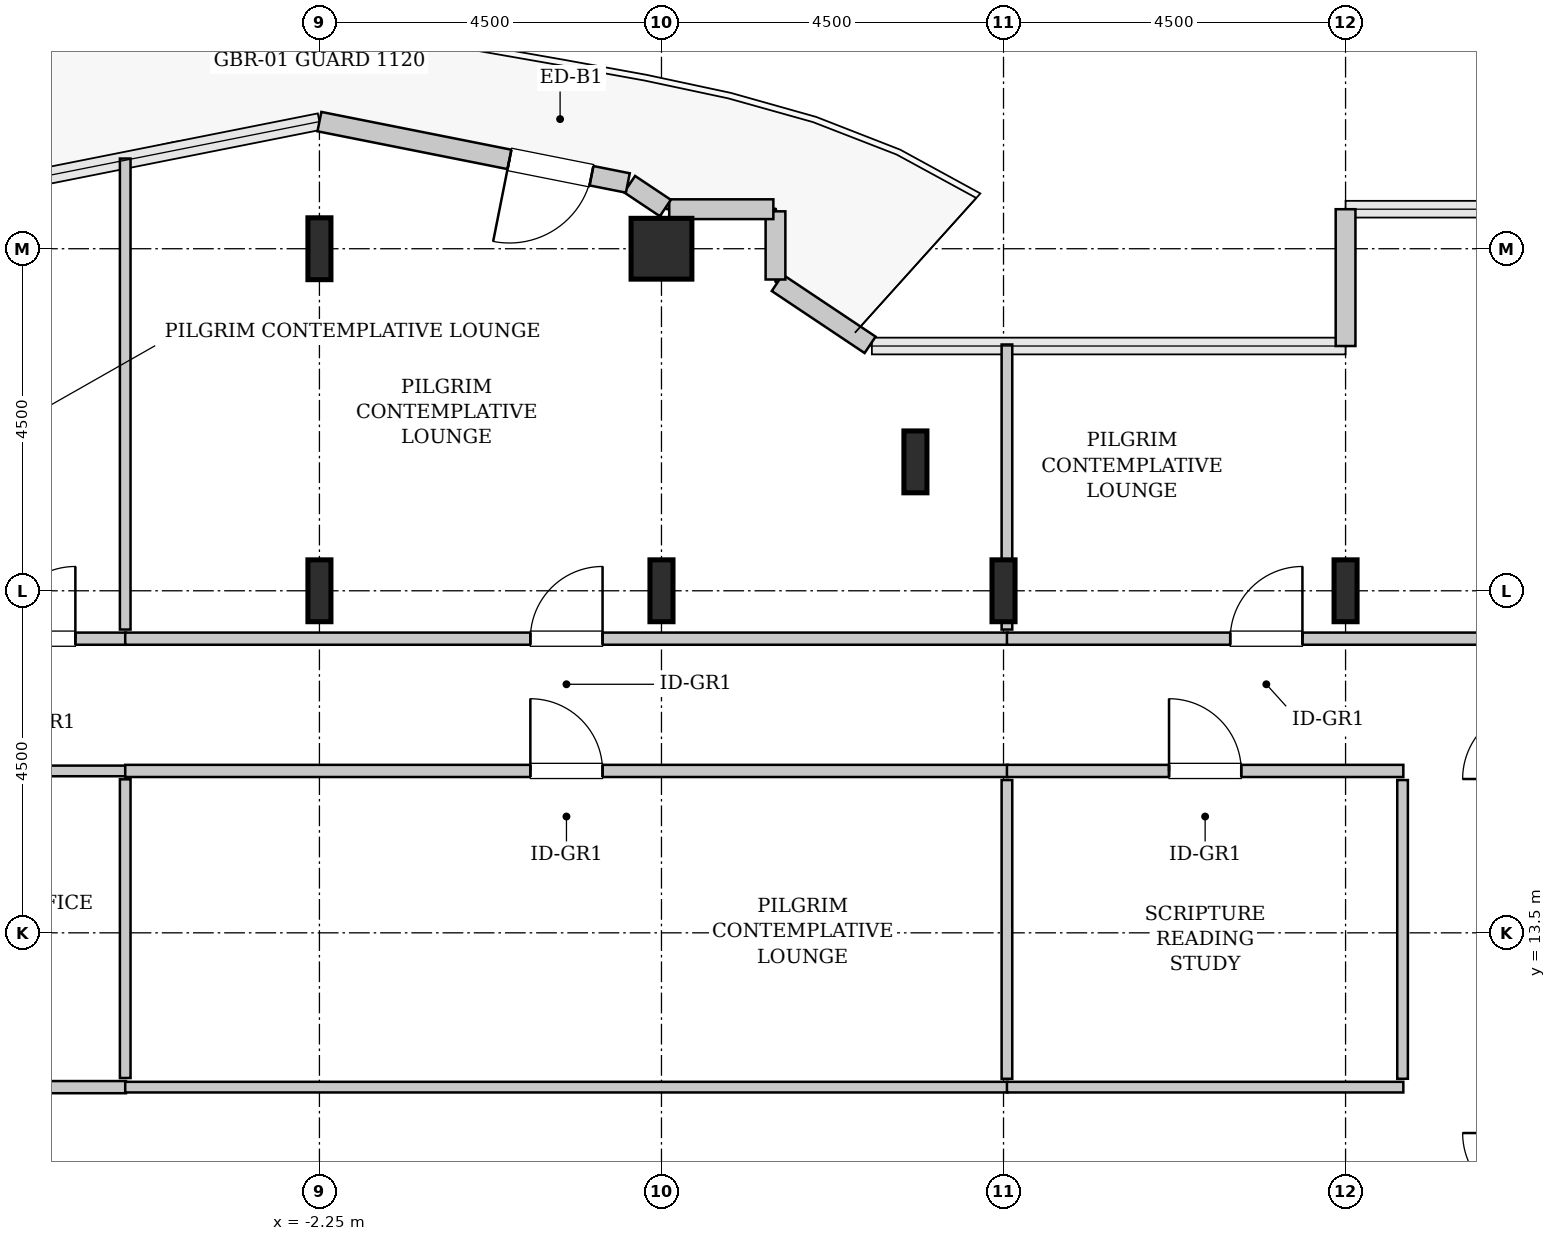
"""IFC4 building model, lengths in metres.
Left out: names, types, materials, properties, quantities, classifications, styles, units other than length and angle.
Written with IfcOpenShell. Run it as: python <this file> out.ifc"""

import sys

from ifc_helpers import new_model, si_unit, direction, frame, frame_2d, origin, origin_2d, place, context, subcontext, project, spatial, rectangle, hollow_rectangle, i_section, extrude, source, transform, mapped, element, fill, save


model = new_model("IFC4")
c1 = context("Model", 3, precision=1e-05, world=origin(), true_north=direction((0.0, 1.0)))
c2 = subcontext(c1, "Body", "Model", "MODEL_VIEW")
j1 = project(units=[si_unit("LENGTHUNIT", "METRE"), si_unit("PLANEANGLEUNIT", "RADIAN")], contexts=[c1])
p1 = place(None, origin())
s1 = spatial("IfcSite", under=j1, at=p1, CompositionType="ELEMENT")
p2 = place(p1, origin())
s2 = spatial("IfcBuilding", under=s1, at=p2, CompositionType="ELEMENT")
p3 = place(p2, frame((0.0, 0.0, 164.0)))
s3 = spatial("IfcBuildingStorey", under=s2, at=p3, CompositionType="ELEMENT", Elevation=164.0)
m1 = source(origin(), c2, "Body", "SweptSolid", [
    extrude(i_section(OverallWidth=0.303, OverallDepth=0.814, WebThickness=0.021, FlangeThickness=0.04, FilletRadius=0.03, at=origin_2d()), origin(), (0.0, 0.0, 1.0), 3.8),
])
for number, where, z_axis, x_axis in (
    (1, (-2.25, 18.0, 0.0), (0.0, 0.0, 1.0), (1.0, 0.0, 0.0)),
    (2, (-2.25, 22.5, 0.0), (0.0, 0.0, 1.0), (1.0, 0.0, 0.0)),
    (3, (2.25, 18.0, 0.0), (0.0, 0.0, 1.0), (1.0, 0.0, 0.0)),
):
    element("IfcColumn", number, at=place(p3, frame(where, z_axis=z_axis, x_axis=x_axis)), inside=s3, PredefinedType="COLUMN", context=c2, shape_type="MappedRepresentation", body=[
        mapped(m1, transform((0.0, 0.0, 0.0), x_axis=(1.0, 0.0, 0.0), y_axis=(0.0, 1.0, 0.0), z_axis=(0.0, 0.0, 1.0), scale=1.0)),
    ])
m2 = source(origin(), c2, "Body", "SweptSolid", [
    extrude(hollow_rectangle(XDim=0.8, YDim=0.8, WallThickness=0.04, InnerFilletRadius=0.04, OuterFilletRadius=0.08, at=origin_2d()), origin(), (0.0, 0.0, 1.0), 3.8),
])
p4 = place(p3, frame((2.25, 22.5, 0.0), z_axis=(0.0, 0.0, 1.0), x_axis=(1.0, 0.0, 0.0)))
e4 = element("IfcColumn", 4, at=p4, inside=s3, PredefinedType="COLUMN", context=c2, shape_type="MappedRepresentation", body=[
    mapped(m2, transform((0.0, 0.0, 0.0), x_axis=(1.0, 0.0, 0.0), y_axis=(0.0, 1.0, 0.0), z_axis=(0.0, 0.0, 1.0), scale=1.0)),
])
for number, where, z_axis, x_axis in (
    (5, (5.591, 19.696, 0.0), (0.0, 0.0, 1.0), (1.0, 0.0, 0.0)),
    (6, (6.75, 18.0, 0.0), (0.0, 0.0, 1.0), (1.0, 0.0, 0.0)),
    (7, (11.25, 18.0, 0.0), (0.0, 0.0, 1.0), (1.0, 0.0, 0.0)),
):
    element("IfcColumn", number, at=place(p3, frame(where, z_axis=z_axis, x_axis=x_axis)), inside=s3, PredefinedType="COLUMN", context=c2, shape_type="MappedRepresentation", body=[
        mapped(m1, transform((0.0, 0.0, 0.0), x_axis=(1.0, 0.0, 0.0), y_axis=(0.0, 1.0, 0.0), z_axis=(0.0, 0.0, 1.0), scale=1.0)),
    ])
m3 = source(origin(), c2, "Body", "SweptSolid", [
    extrude(rectangle(XDim=1.8, YDim=0.26, at=frame_2d((0.9, 0.0))), origin(), (0.0, 0.0, 1.0), 3.55),
])
p5 = place(p3, frame((11.25, 23.02, 0.0), z_axis=(0.0, 0.0, 1.0), x_axis=(0.0, -1.0, 0.0)))
e8 = element("IfcWall", 8, at=p5, inside=s3, PredefinedType="SOLIDWALL", context=c2, shape_type="MappedRepresentation", body=[
    mapped(m3, transform((0.0, 0.0, 0.0), x_axis=(1.0, 0.0, 0.0), y_axis=(0.0, 1.0, 0.0), z_axis=(0.0, 0.0, 1.0), scale=1.0)),
])
m4 = source(origin(), c2, "Body", "SweptSolid", [
    extrude(rectangle(XDim=1.469, YDim=0.26, at=frame_2d((0.734, 0.0))), origin(), (0.0, 0.0, 1.0), 3.55),
])
p6 = place(p3, frame((4.995, 21.236, 0.0), z_axis=(0.0, 0.0, 1.0), x_axis=(-0.831461760506, 0.555581983884, 0.0)))
e9 = element("IfcWall", 9, at=p6, inside=s3, PredefinedType="SOLIDWALL", context=c2, shape_type="MappedRepresentation", body=[
    mapped(m4, transform((0.0, 0.0, 0.0), x_axis=(1.0, 0.0, 0.0), y_axis=(0.0, 1.0, 0.0), z_axis=(0.0, 0.0, 1.0), scale=1.0)),
])
m5 = source(origin(), c2, "Body", "SweptSolid", [
    extrude(rectangle(XDim=0.897, YDim=0.26, at=frame_2d((0.448, 0.0))), origin(), (0.0, 0.0, 1.0), 3.55),
])
p7 = place(p3, frame((3.75, 22.095, 0.0), z_axis=(0.0, 0.0, 1.0), x_axis=(0.0, 1.0, 0.0)))
e10 = element("IfcWall", 10, at=p7, inside=s3, PredefinedType="SOLIDWALL", context=c2, shape_type="MappedRepresentation", body=[
    mapped(m5, transform((0.0, 0.0, 0.0), x_axis=(1.0, 0.0, 0.0), y_axis=(0.0, 1.0, 0.0), z_axis=(0.0, 0.0, 1.0), scale=1.0)),
])
m6 = source(origin(), c2, "Body", "SweptSolid", [
    extrude(rectangle(XDim=1.37, YDim=0.26, at=frame_2d((0.685, 0.0))), origin(), (0.0, 0.0, 1.0), 3.55),
])
p8 = place(p3, frame((3.722, 23.02, 0.0), z_axis=(0.0, 0.0, 1.0), x_axis=(-1.0, 0.0, 0.0)))
e11 = element("IfcWall", 11, at=p8, inside=s3, PredefinedType="SOLIDWALL", context=c2, shape_type="MappedRepresentation", body=[
    mapped(m6, transform((0.0, 0.0, 0.0), x_axis=(1.0, 0.0, 0.0), y_axis=(0.0, 1.0, 0.0), z_axis=(0.0, 0.0, 1.0), scale=1.0)),
])
m7 = source(origin(), c2, "Body", "SweptSolid", [
    extrude(rectangle(XDim=0.565, YDim=0.26, at=frame_2d((0.283, 0.0))), origin(), (0.0, 0.0, 1.0), 3.55),
])
p9 = place(p3, frame((2.301, 23.036, 0.0), z_axis=(0.0, 0.0, 1.0), x_axis=(-0.831651492666, 0.555297933317, 0.0)))
e12 = element("IfcWall", 12, at=p9, inside=s3, PredefinedType="SOLIDWALL", context=c2, shape_type="MappedRepresentation", body=[
    mapped(m7, transform((0.0, 0.0, 0.0), x_axis=(1.0, 0.0, 0.0), y_axis=(0.0, 1.0, 0.0), z_axis=(0.0, 0.0, 1.0), scale=1.0)),
])
m8 = source(origin(), c2, "Body", "SweptSolid", [
    extrude(rectangle(XDim=4.137, YDim=0.26, at=frame_2d((2.068, 0.0))), origin(), (0.0, 0.0, 1.0), 3.55),
])
p10 = place(p3, frame((1.807, 23.365, 0.0), z_axis=(0.0, 0.0, 1.0), x_axis=(-0.980782170794, 0.195105954428, 0.0)))
e13 = element("IfcWall", 13, at=p10, inside=s3, PredefinedType="SOLIDWALL", context=c2, shape_type="MappedRepresentation", body=[
    mapped(m8, transform((0.0, 0.0, 0.0), x_axis=(1.0, 0.0, 0.0), y_axis=(0.0, 1.0, 0.0), z_axis=(0.0, 0.0, 1.0), scale=1.0)),
])
p11 = place(p10, frame((0.488, 0.0, 0.0)))
e14 = element("IfcOpeningElement", 14, at=p11, cuts=e13, PredefinedType="OPENING", context=c2, shape_type="SweptSolid", body=[
    extrude(rectangle(XDim=1.1, YDim=2.2, at=frame_2d((0.55, 1.1))), frame((0.0, 0.14, 0.0), z_axis=(0.0, -1.0, 0.0), x_axis=(1.0, 0.0, 0.0)), (0.0, 0.0, 1.0), 0.28),
])
m9 = source(origin(), c2, "Body", "SweptSolid", [
    extrude(rectangle(XDim=7.215, YDim=0.16, at=frame_2d((3.607, 0.0))), origin(), (0.0, 0.0, 1.0), 3.535),
])
p12 = place(p3, frame((-12.01, 11.47, 0.0), z_axis=(0.0, 0.0, 1.0), x_axis=(1.0, 0.0, 0.0)))
e15 = element("IfcWall", 15, at=p12, inside=s3, PredefinedType="PARTITIONING", context=c2, shape_type="MappedRepresentation", body=[
    mapped(m9, transform((0.0, 0.0, 0.0), x_axis=(1.0, 0.0, 0.0), y_axis=(0.0, 1.0, 0.0), z_axis=(0.0, 0.0, 1.0), scale=1.0)),
])
p13 = place(p12, frame((3.133, 0.0, 0.0)))
e16 = element("IfcOpeningElement", 16, at=p13, cuts=e15, PredefinedType="OPENING", context=c2, shape_type="SweptSolid", body=[
    extrude(rectangle(XDim=0.95, YDim=2.1, at=frame_2d((0.475, 1.05))), frame((0.0, 0.09, 0.0), z_axis=(0.0, -1.0, 0.0), x_axis=(1.0, 0.0, 0.0)), (0.0, 0.0, 1.0), 0.18),
])
m10 = source(origin(), c2, "Body", "SweptSolid", [
    extrude(rectangle(XDim=7.215, YDim=0.14, at=frame_2d((3.607, 0.0))), origin(), (0.0, 0.0, 1.0), 3.535),
])
p14 = place(p3, frame((-12.01, 15.63, 0.0), z_axis=(0.0, 0.0, 1.0), x_axis=(1.0, 0.0, 0.0)))
e17 = element("IfcWall", 17, at=p14, inside=s3, PredefinedType="PARTITIONING", context=c2, shape_type="MappedRepresentation", body=[
    mapped(m10, transform((0.0, 0.0, 0.0), x_axis=(1.0, 0.0, 0.0), y_axis=(0.0, 1.0, 0.0), z_axis=(0.0, 0.0, 1.0), scale=1.0)),
])
m11 = source(origin(), c2, "Body", "SweptSolid", [
    extrude(rectangle(XDim=3.93, YDim=0.14, at=frame_2d((1.965, 0.0))), origin(), (0.0, 0.0, 1.0), 3.535),
])
p15 = place(p3, frame((-4.805, 11.59, 0.0), z_axis=(0.0, 0.0, 1.0), x_axis=(0.0, 1.0, 0.0)))
e18 = element("IfcWall", 18, at=p15, inside=s3, PredefinedType="PARTITIONING", context=c2, shape_type="MappedRepresentation", body=[
    mapped(m11, transform((0.0, 0.0, 0.0), x_axis=(1.0, 0.0, 0.0), y_axis=(0.0, 1.0, 0.0), z_axis=(0.0, 0.0, 1.0), scale=1.0)),
])
m12 = source(origin(), c2, "Body", "SweptSolid", [
    extrude(rectangle(XDim=2.645, YDim=0.16, at=frame_2d((1.323, 0.0))), origin(), (0.0, 0.0, 1.0), 3.535),
])
p16 = place(p3, frame((-7.44, 17.37, 0.0), z_axis=(0.0, 0.0, 1.0), x_axis=(1.0, 0.0, 0.0)))
e19 = element("IfcWall", 19, at=p16, inside=s3, PredefinedType="PARTITIONING", context=c2, shape_type="MappedRepresentation", body=[
    mapped(m12, transform((0.0, 0.0, 0.0), x_axis=(1.0, 0.0, 0.0), y_axis=(0.0, 1.0, 0.0), z_axis=(0.0, 0.0, 1.0), scale=1.0)),
])
p17 = place(p16, frame((1.029, 0.0, 0.0)))
e20 = element("IfcOpeningElement", 20, at=p17, cuts=e19, PredefinedType="OPENING", context=c2, shape_type="SweptSolid", body=[
    extrude(rectangle(XDim=0.95, YDim=2.1, at=frame_2d((0.475, 1.05))), frame((0.0, 0.09, 0.0), z_axis=(0.0, -1.0, 0.0), x_axis=(1.0, 0.0, 0.0)), (0.0, 0.0, 1.0), 0.18),
])
m13 = source(origin(), c2, "Body", "SweptSolid", [
    extrude(rectangle(XDim=6.197, YDim=0.14, at=frame_2d((3.098, 0.0))), origin(), (0.0, 0.0, 1.0), 3.535),
])
p18 = place(p3, frame((-4.805, 17.49, 0.0), z_axis=(0.0, 0.0, 1.0), x_axis=(0.0, 1.0, 0.0)))
e21 = element("IfcWall", 21, at=p18, inside=s3, PredefinedType="PARTITIONING", context=c2, shape_type="MappedRepresentation", body=[
    mapped(m13, transform((0.0, 0.0, 0.0), x_axis=(1.0, 0.0, 0.0), y_axis=(0.0, 1.0, 0.0), z_axis=(0.0, 0.0, 1.0), scale=1.0)),
])
m14 = source(origin(), c2, "Body", "SweptSolid", [
    extrude(rectangle(XDim=11.61, YDim=0.16, at=frame_2d((5.805, 0.0))), origin(), (0.0, 0.0, 1.0), 3.535),
])
p19 = place(p3, frame((-4.805, 17.37, 0.0), z_axis=(0.0, 0.0, 1.0), x_axis=(1.0, 0.0, 0.0)))
e22 = element("IfcWall", 22, at=p19, inside=s3, PredefinedType="PARTITIONING", context=c2, shape_type="MappedRepresentation", body=[
    mapped(m14, transform((0.0, 0.0, 0.0), x_axis=(1.0, 0.0, 0.0), y_axis=(0.0, 1.0, 0.0), z_axis=(0.0, 0.0, 1.0), scale=1.0)),
])
p20 = place(p19, frame((5.33, 0.0, 0.0)))
e23 = element("IfcOpeningElement", 23, at=p20, cuts=e22, PredefinedType="OPENING", context=c2, shape_type="SweptSolid", body=[
    extrude(rectangle(XDim=0.95, YDim=2.1, at=frame_2d((0.475, 1.05))), frame((0.0, 0.09, 0.0), z_axis=(0.0, -1.0, 0.0), x_axis=(1.0, 0.0, 0.0)), (0.0, 0.0, 1.0), 0.18),
])
m15 = source(origin(), c2, "Body", "SweptSolid", [
    extrude(rectangle(XDim=3.75, YDim=0.14, at=frame_2d((1.875, 0.0))), origin(), (0.0, 0.0, 1.0), 3.535),
])
p21 = place(p3, frame((6.795, 17.49, 0.0), z_axis=(0.0, 0.0, 1.0), x_axis=(0.0, 1.0, 0.0)))
e24 = element("IfcWall", 24, at=p21, inside=s3, PredefinedType="PARTITIONING", context=c2, shape_type="MappedRepresentation", body=[
    mapped(m15, transform((0.0, 0.0, 0.0), x_axis=(1.0, 0.0, 0.0), y_axis=(0.0, 1.0, 0.0), z_axis=(0.0, 0.0, 1.0), scale=1.0)),
])
p22 = place(p3, frame((-4.805, 15.63, 0.0), z_axis=(0.0, 0.0, 1.0), x_axis=(1.0, 0.0, 0.0)))
e25 = element("IfcWall", 25, at=p22, inside=s3, PredefinedType="PARTITIONING", context=c2, shape_type="MappedRepresentation", body=[
    mapped(m14, transform((0.0, 0.0, 0.0), x_axis=(1.0, 0.0, 0.0), y_axis=(0.0, 1.0, 0.0), z_axis=(0.0, 0.0, 1.0), scale=1.0)),
])
p23 = place(p22, frame((5.33, 0.0, 0.0)))
e26 = element("IfcOpeningElement", 26, at=p23, cuts=e25, PredefinedType="OPENING", context=c2, shape_type="SweptSolid", body=[
    extrude(rectangle(XDim=0.95, YDim=2.1, at=frame_2d((0.475, 1.05))), frame((0.0, 0.09, 0.0), z_axis=(0.0, -1.0, 0.0), x_axis=(1.0, 0.0, 0.0)), (0.0, 0.0, 1.0), 0.18),
])
m16 = source(origin(), c2, "Body", "SweptSolid", [
    extrude(rectangle(XDim=11.61, YDim=0.14, at=frame_2d((5.805, 0.0))), origin(), (0.0, 0.0, 1.0), 3.535),
])
p24 = place(p3, frame((-4.805, 11.47, 0.0), z_axis=(0.0, 0.0, 1.0), x_axis=(1.0, 0.0, 0.0)))
e27 = element("IfcWall", 27, at=p24, inside=s3, PredefinedType="PARTITIONING", context=c2, shape_type="MappedRepresentation", body=[
    mapped(m16, transform((0.0, 0.0, 0.0), x_axis=(1.0, 0.0, 0.0), y_axis=(0.0, 1.0, 0.0), z_axis=(0.0, 0.0, 1.0), scale=1.0)),
])
p25 = place(p3, frame((6.795, 11.58, 0.0), z_axis=(0.0, 0.0, 1.0), x_axis=(0.0, 1.0, 0.0)))
e28 = element("IfcWall", 28, at=p25, inside=s3, PredefinedType="PARTITIONING", context=c2, shape_type="MappedRepresentation", body=[
    mapped(m11, transform((0.0, 0.0, 0.0), x_axis=(1.0, 0.0, 0.0), y_axis=(0.0, 1.0, 0.0), z_axis=(0.0, 0.0, 1.0), scale=1.0)),
])
m17 = source(origin(), c2, "Body", "SweptSolid", [
    extrude(rectangle(XDim=6.825, YDim=0.16, at=frame_2d((3.413, 0.0))), origin(), (0.0, 0.0, 1.0), 3.535),
])
p26 = place(p3, frame((6.795, 17.37, 0.0), z_axis=(0.0, 0.0, 1.0), x_axis=(1.0, 0.0, 0.0)))
e29 = element("IfcWall", 29, at=p26, inside=s3, PredefinedType="PARTITIONING", context=c2, shape_type="MappedRepresentation", body=[
    mapped(m17, transform((0.0, 0.0, 0.0), x_axis=(1.0, 0.0, 0.0), y_axis=(0.0, 1.0, 0.0), z_axis=(0.0, 0.0, 1.0), scale=1.0)),
])
p27 = place(p26, frame((2.938, 0.0, 0.0)))
e30 = element("IfcOpeningElement", 30, at=p27, cuts=e29, PredefinedType="OPENING", context=c2, shape_type="SweptSolid", body=[
    extrude(rectangle(XDim=0.95, YDim=2.1, at=frame_2d((0.475, 1.05))), frame((0.0, 0.09, 0.0), z_axis=(0.0, -1.0, 0.0), x_axis=(1.0, 0.0, 0.0)), (0.0, 0.0, 1.0), 0.18),
])
m18 = source(origin(), c2, "Body", "SweptSolid", [
    extrude(rectangle(XDim=5.215, YDim=0.16, at=frame_2d((2.607, 0.0))), origin(), (0.0, 0.0, 1.0), 3.535),
])
p28 = place(p3, frame((6.795, 15.63, 0.0), z_axis=(0.0, 0.0, 1.0), x_axis=(1.0, 0.0, 0.0)))
e31 = element("IfcWall", 31, at=p28, inside=s3, PredefinedType="PARTITIONING", context=c2, shape_type="MappedRepresentation", body=[
    mapped(m18, transform((0.0, 0.0, 0.0), x_axis=(1.0, 0.0, 0.0), y_axis=(0.0, 1.0, 0.0), z_axis=(0.0, 0.0, 1.0), scale=1.0)),
])
p29 = place(p28, frame((2.133, 0.0, 0.0)))
e32 = element("IfcOpeningElement", 32, at=p29, cuts=e31, PredefinedType="OPENING", context=c2, shape_type="SweptSolid", body=[
    extrude(rectangle(XDim=0.95, YDim=2.1, at=frame_2d((0.475, 1.05))), frame((0.0, 0.09, 0.0), z_axis=(0.0, -1.0, 0.0), x_axis=(1.0, 0.0, 0.0)), (0.0, 0.0, 1.0), 0.18),
])
m19 = source(origin(), c2, "Body", "SweptSolid", [
    extrude(rectangle(XDim=5.215, YDim=0.14, at=frame_2d((2.607, 0.0))), origin(), (0.0, 0.0, 1.0), 3.535),
])
p30 = place(p3, frame((6.795, 11.47, 0.0), z_axis=(0.0, 0.0, 1.0), x_axis=(1.0, 0.0, 0.0)))
e33 = element("IfcWall", 33, at=p30, inside=s3, PredefinedType="PARTITIONING", context=c2, shape_type="MappedRepresentation", body=[
    mapped(m19, transform((0.0, 0.0, 0.0), x_axis=(1.0, 0.0, 0.0), y_axis=(0.0, 1.0, 0.0), z_axis=(0.0, 0.0, 1.0), scale=1.0)),
])
p31 = place(p3, frame((12.0, 11.58, 0.0), z_axis=(0.0, 0.0, 1.0), x_axis=(0.0, 1.0, 0.0)))
e34 = element("IfcWall", 34, at=p31, inside=s3, PredefinedType="PARTITIONING", context=c2, shape_type="MappedRepresentation", body=[
    mapped(m11, transform((0.0, 0.0, 0.0), x_axis=(1.0, 0.0, 0.0), y_axis=(0.0, 1.0, 0.0), z_axis=(0.0, 0.0, 1.0), scale=1.0)),
])
m20 = source(origin(), c2, "Body", "SweptSolid", [
    extrude(rectangle(XDim=1.1, YDim=2.2, at=frame_2d((0.55, 1.1))), frame((0.0, 0.025, 0.0), z_axis=(0.0, -1.0, 0.0), x_axis=(1.0, 0.0, 0.0)), (0.0, 0.0, 1.0), 0.05),
])
p32 = place(p11, origin())
e35 = element("IfcDoor", 35, at=p32, inside=s3, OperationType="SINGLE_SWING_RIGHT", PredefinedType="DOOR", context=c2, shape_type="MappedRepresentation", body=[
    mapped(m20, transform((0.0, 0.0, 0.0), x_axis=(1.0, 0.0, 0.0), y_axis=(0.0, 1.0, 0.0), z_axis=(0.0, 0.0, 1.0), scale=1.0)),
])
fill(e14, e35)
m21 = source(origin(), c2, "Body", "SweptSolid", [
    extrude(rectangle(XDim=0.95, YDim=2.1, at=frame_2d((0.475, 1.05))), frame((0.0, 0.025, 0.0), z_axis=(0.0, -1.0, 0.0), x_axis=(1.0, 0.0, 0.0)), (0.0, 0.0, 1.0), 0.05),
])
p33 = place(p17, origin())
e36 = element("IfcDoor", 36, at=p33, inside=s3, OperationType="SINGLE_SWING_RIGHT", PredefinedType="DOOR", context=c2, shape_type="MappedRepresentation", body=[
    mapped(m21, transform((0.0, 0.0, 0.0), x_axis=(1.0, 0.0, 0.0), y_axis=(0.0, 1.0, 0.0), z_axis=(0.0, 0.0, 1.0), scale=1.0)),
])
fill(e20, e36)
p34 = place(p20, origin())
e37 = element("IfcDoor", 37, at=p34, inside=s3, OperationType="SINGLE_SWING_RIGHT", PredefinedType="DOOR", context=c2, shape_type="MappedRepresentation", body=[
    mapped(m21, transform((0.0, 0.0, 0.0), x_axis=(1.0, 0.0, 0.0), y_axis=(0.0, 1.0, 0.0), z_axis=(0.0, 0.0, 1.0), scale=1.0)),
])
fill(e23, e37)
p35 = place(p23, origin())
e38 = element("IfcDoor", 38, at=p35, inside=s3, OperationType="SINGLE_SWING_LEFT", PredefinedType="DOOR", context=c2, shape_type="MappedRepresentation", body=[
    mapped(m21, transform((0.0, 0.0, 0.0), x_axis=(1.0, 0.0, 0.0), y_axis=(0.0, 1.0, 0.0), z_axis=(0.0, 0.0, 1.0), scale=1.0)),
])
fill(e26, e38)
p36 = place(p27, origin())
e39 = element("IfcDoor", 39, at=p36, inside=s3, OperationType="SINGLE_SWING_RIGHT", PredefinedType="DOOR", context=c2, shape_type="MappedRepresentation", body=[
    mapped(m21, transform((0.0, 0.0, 0.0), x_axis=(1.0, 0.0, 0.0), y_axis=(0.0, 1.0, 0.0), z_axis=(0.0, 0.0, 1.0), scale=1.0)),
])
fill(e30, e39)
p37 = place(p29, origin())
e40 = element("IfcDoor", 40, at=p37, inside=s3, OperationType="SINGLE_SWING_LEFT", PredefinedType="DOOR", context=c2, shape_type="MappedRepresentation", body=[
    mapped(m21, transform((0.0, 0.0, 0.0), x_axis=(1.0, 0.0, 0.0), y_axis=(0.0, 1.0, 0.0), z_axis=(0.0, 0.0, 1.0), scale=1.0)),
])
fill(e32, e40)
save(model, sys.argv[1])
